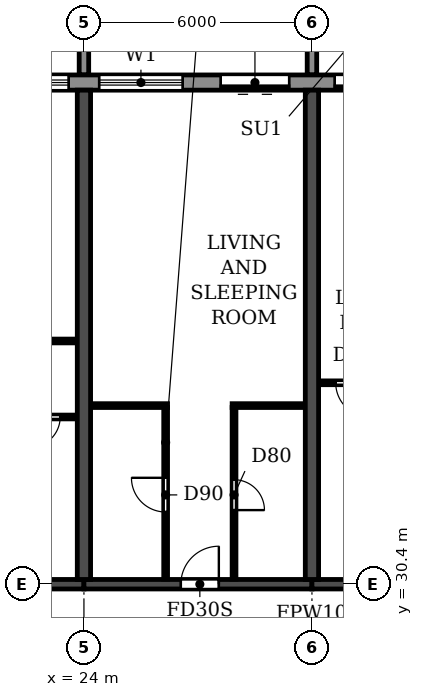
"""IFC4 building model, lengths in metres.
Left out: names, types, materials, properties, quantities, classifications, styles, units other than length and angle.
Written with IfcOpenShell. Run it as: python <this file> out.ifc"""

import sys

from ifc_helpers import new_model, si_unit, direction, frame, frame_2d, origin, place, context, subcontext, project, spatial, polyline, rectangle, outline, extrude, source, transform, mapped, element, fill, save


model = new_model("IFC4")
c1 = context("Model", 3, precision=1e-05, world=origin(), true_north=direction((0.0, 1.0)))
c2 = subcontext(c1, "Body", "Model", "MODEL_VIEW")
j1 = project(units=[si_unit("LENGTHUNIT", "METRE"), si_unit("PLANEANGLEUNIT", "RADIAN")], contexts=[c1])
p1 = place(None, origin())
s1 = spatial("IfcSite", under=j1, at=p1, CompositionType="ELEMENT")
p2 = place(p1, origin())
s2 = spatial("IfcBuilding", under=s1, at=p2, CompositionType="ELEMENT")
p3 = place(p2, frame((0.0, 0.0, 112.5)))
s3 = spatial("IfcBuildingStorey", under=s2, at=p3, CompositionType="ELEMENT", Elevation=112.5)
for number, where, z_axis, x_axis in (
    (1, (24.0, 30.525, 0.0), (0.0, 0.0, 1.0), (0.0, 1.0, 0.0)),
    (2, (30.0, 30.525, 0.0), (0.0, 0.0, 1.0), (0.0, 1.0, 0.0)),
):
    element("IfcWall", number, at=place(p3, frame(where, z_axis=z_axis, x_axis=x_axis)), inside=s3, PredefinedType="SHEAR", context=c2, shape_type="SweptSolid", body=[
        extrude(rectangle(XDim=12.875, YDim=0.35, at=frame_2d((6.438, 0.0))), origin(), (0.0, 0.0, 1.0), 2.95),
    ])
p4 = place(p3, frame((18.0, 30.4, 0.0), z_axis=(0.0, 0.0, 1.0), x_axis=(1.0, 0.0, 0.0)))
e3 = element("IfcWall", 3, at=p4, inside=s3, PredefinedType="SHEAR", context=c2, shape_type="SweptSolid", body=[
    extrude(rectangle(XDim=6.0, YDim=0.25, at=frame_2d((3.0, 0.0))), origin(), (0.0, 0.0, 1.0), 2.35),
])
p5 = place(p4, frame((2.55, 0.0, 0.0)))
e4 = element("IfcOpeningElement", 4, at=p5, cuts=e3, PredefinedType="OPENING", context=c2, shape_type="SweptSolid", body=[
    extrude(rectangle(XDim=1.0, YDim=2.1, at=frame_2d((0.5, 1.05))), frame((0.0, 0.135, 0.0), z_axis=(0.0, -1.0, 0.0), x_axis=(1.0, 0.0, 0.0)), (0.0, 0.0, 1.0), 0.27),
])
p6 = place(p3, frame((24.0, 30.4, 0.0), z_axis=(0.0, 0.0, 1.0), x_axis=(1.0, 0.0, 0.0)))
e5 = element("IfcWall", 5, at=p6, inside=s3, PredefinedType="SHEAR", context=c2, shape_type="SweptSolid", body=[
    extrude(rectangle(XDim=6.0, YDim=0.25, at=frame_2d((3.0, 0.0))), origin(), (0.0, 0.0, 1.0), 2.35),
])
p7 = place(p6, frame((2.55, 0.0, 0.0)))
e6 = element("IfcOpeningElement", 6, at=p7, cuts=e5, PredefinedType="OPENING", context=c2, shape_type="SweptSolid", body=[
    extrude(rectangle(XDim=1.0, YDim=2.1, at=frame_2d((0.5, 1.05))), frame((0.0, 0.135, 0.0), z_axis=(0.0, -1.0, 0.0), x_axis=(1.0, 0.0, 0.0)), (0.0, 0.0, 1.0), 0.27),
])
p8 = place(p3, frame((30.0, 30.4, 0.0), z_axis=(0.0, 0.0, 1.0), x_axis=(1.0, 0.0, 0.0)))
e7 = element("IfcWall", 7, at=p8, inside=s3, PredefinedType="SHEAR", context=c2, shape_type="SweptSolid", body=[
    extrude(rectangle(XDim=6.0, YDim=0.25, at=frame_2d((3.0, 0.0))), origin(), (0.0, 0.0, 1.0), 2.35),
])
p9 = place(p8, frame((2.55, 0.0, 0.0)))
e8 = element("IfcOpeningElement", 8, at=p9, cuts=e7, PredefinedType="OPENING", context=c2, shape_type="SweptSolid", body=[
    extrude(rectangle(XDim=1.0, YDim=2.1, at=frame_2d((0.5, 1.05))), frame((0.0, 0.135, 0.0), z_axis=(0.0, -1.0, 0.0), x_axis=(1.0, 0.0, 0.0)), (0.0, 0.0, 1.0), 0.27),
])
p10 = place(p3, frame((85.317, 43.6, 0.0), z_axis=(0.0, 0.0, 1.0), x_axis=(-1.0, 0.0, 0.0)))
e9 = element("IfcWall", 9, at=p10, inside=s3, PredefinedType="STANDARD", context=c2, shape_type="SweptSolid", body=[
    extrude(rectangle(XDim=68.634, YDim=0.4, at=frame_2d((34.317, 0.0))), origin(), (0.0, 0.0, 1.0), 2.95),
])
p11 = place(p10, frame((64.917, 0.0, 0.0)))
e10 = element("IfcOpeningElement", 10, at=p11, cuts=e9, PredefinedType="OPENING", context=c2, shape_type="SweptSolid", body=[
    extrude(rectangle(XDim=1.8, YDim=2.4, at=frame_2d((0.9, 1.2))), frame((0.0, 0.21, 0.0), z_axis=(0.0, -1.0, 0.0), x_axis=(1.0, 0.0, 0.0)), (0.0, 0.0, 1.0), 0.42),
])
p12 = place(p10, frame((61.717, 0.0, 0.9)))
e11 = element("IfcOpeningElement", 11, at=p12, cuts=e9, PredefinedType="OPENING", context=c2, shape_type="SweptSolid", body=[
    extrude(rectangle(XDim=2.2, YDim=1.5, at=frame_2d((1.1, 0.75))), frame((0.0, 0.21, 0.0), z_axis=(0.0, -1.0, 0.0), x_axis=(1.0, 0.0, 0.0)), (0.0, 0.0, 1.0), 0.42),
])
p13 = place(p10, frame((58.717, 0.0, 0.9)))
e12 = element("IfcOpeningElement", 12, at=p13, cuts=e9, PredefinedType="OPENING", context=c2, shape_type="SweptSolid", body=[
    extrude(rectangle(XDim=2.2, YDim=1.5, at=frame_2d((1.1, 0.75))), frame((0.0, 0.21, 0.0), z_axis=(0.0, -1.0, 0.0), x_axis=(1.0, 0.0, 0.0)), (0.0, 0.0, 1.0), 0.42),
])
p14 = place(p10, frame((55.917, 0.0, 0.0)))
e13 = element("IfcOpeningElement", 13, at=p14, cuts=e9, PredefinedType="OPENING", context=c2, shape_type="SweptSolid", body=[
    extrude(rectangle(XDim=1.8, YDim=2.4, at=frame_2d((0.9, 1.2))), frame((0.0, 0.21, 0.0), z_axis=(0.0, -1.0, 0.0), x_axis=(1.0, 0.0, 0.0)), (0.0, 0.0, 1.0), 0.42),
])
p15 = place(p10, frame((52.917, 0.0, 0.0)))
e14 = element("IfcOpeningElement", 14, at=p15, cuts=e9, PredefinedType="OPENING", context=c2, shape_type="SweptSolid", body=[
    extrude(rectangle(XDim=1.8, YDim=2.4, at=frame_2d((0.9, 1.2))), frame((0.0, 0.21, 0.0), z_axis=(0.0, -1.0, 0.0), x_axis=(1.0, 0.0, 0.0)), (0.0, 0.0, 1.0), 0.42),
])
p16 = place(p10, frame((49.717, 0.0, 0.9)))
e15 = element("IfcOpeningElement", 15, at=p16, cuts=e9, PredefinedType="OPENING", context=c2, shape_type="SweptSolid", body=[
    extrude(rectangle(XDim=2.2, YDim=1.5, at=frame_2d((1.1, 0.75))), frame((0.0, 0.21, 0.0), z_axis=(0.0, -1.0, 0.0), x_axis=(1.0, 0.0, 0.0)), (0.0, 0.0, 1.0), 0.42),
])
p17 = place(p10, frame((46.717, 0.0, 0.9)))
e16 = element("IfcOpeningElement", 16, at=p17, cuts=e9, PredefinedType="OPENING", context=c2, shape_type="SweptSolid", body=[
    extrude(rectangle(XDim=2.2, YDim=1.5, at=frame_2d((1.1, 0.75))), frame((0.0, 0.21, 0.0), z_axis=(0.0, -1.0, 0.0), x_axis=(1.0, 0.0, 0.0)), (0.0, 0.0, 1.0), 0.42),
])
p18 = place(p10, frame((43.917, 0.0, 0.0)))
e17 = element("IfcOpeningElement", 17, at=p18, cuts=e9, PredefinedType="OPENING", context=c2, shape_type="SweptSolid", body=[
    extrude(rectangle(XDim=1.8, YDim=2.4, at=frame_2d((0.9, 1.2))), frame((0.0, 0.21, 0.0), z_axis=(0.0, -1.0, 0.0), x_axis=(1.0, 0.0, 0.0)), (0.0, 0.0, 1.0), 0.42),
])
p19 = place(p10, frame((40.717, 0.0, 0.9)))
e18 = element("IfcOpeningElement", 18, at=p19, cuts=e9, PredefinedType="OPENING", context=c2, shape_type="SweptSolid", body=[
    extrude(rectangle(XDim=2.2, YDim=1.5, at=frame_2d((1.1, 0.75))), frame((0.0, 0.21, 0.0), z_axis=(0.0, -1.0, 0.0), x_axis=(1.0, 0.0, 0.0)), (0.0, 0.0, 1.0), 0.42),
])
p20 = place(p10, frame((37.717, 0.0, 0.9)))
e19 = element("IfcOpeningElement", 19, at=p20, cuts=e9, PredefinedType="OPENING", context=c2, shape_type="SweptSolid", body=[
    extrude(rectangle(XDim=2.2, YDim=1.5, at=frame_2d((1.1, 0.75))), frame((0.0, 0.21, 0.0), z_axis=(0.0, -1.0, 0.0), x_axis=(1.0, 0.0, 0.0)), (0.0, 0.0, 1.0), 0.42),
])
p21 = place(p10, frame((34.917, 0.0, 0.0)))
e20 = element("IfcOpeningElement", 20, at=p21, cuts=e9, PredefinedType="OPENING", context=c2, shape_type="SweptSolid", body=[
    extrude(rectangle(XDim=1.8, YDim=2.4, at=frame_2d((0.9, 1.2))), frame((0.0, 0.21, 0.0), z_axis=(0.0, -1.0, 0.0), x_axis=(1.0, 0.0, 0.0)), (0.0, 0.0, 1.0), 0.42),
])
p22 = place(p10, frame((31.717, 0.0, 0.9)))
e21 = element("IfcOpeningElement", 21, at=p22, cuts=e9, PredefinedType="OPENING", context=c2, shape_type="SweptSolid", body=[
    extrude(rectangle(XDim=2.2, YDim=1.5, at=frame_2d((1.1, 0.75))), frame((0.0, 0.21, 0.0), z_axis=(0.0, -1.0, 0.0), x_axis=(1.0, 0.0, 0.0)), (0.0, 0.0, 1.0), 0.42),
])
p23 = place(p10, frame((28.917, 0.0, 0.0)))
e22 = element("IfcOpeningElement", 22, at=p23, cuts=e9, PredefinedType="OPENING", context=c2, shape_type="SweptSolid", body=[
    extrude(rectangle(XDim=1.8, YDim=2.4, at=frame_2d((0.9, 1.2))), frame((0.0, 0.21, 0.0), z_axis=(0.0, -1.0, 0.0), x_axis=(1.0, 0.0, 0.0)), (0.0, 0.0, 1.0), 0.42),
])
p24 = place(p10, frame((25.717, 0.0, 0.9)))
e23 = element("IfcOpeningElement", 23, at=p24, cuts=e9, PredefinedType="OPENING", context=c2, shape_type="SweptSolid", body=[
    extrude(rectangle(XDim=2.2, YDim=1.5, at=frame_2d((1.1, 0.75))), frame((0.0, 0.21, 0.0), z_axis=(0.0, -1.0, 0.0), x_axis=(1.0, 0.0, 0.0)), (0.0, 0.0, 1.0), 0.42),
])
p25 = place(p10, frame((22.717, 0.0, 0.9)))
e24 = element("IfcOpeningElement", 24, at=p25, cuts=e9, PredefinedType="OPENING", context=c2, shape_type="SweptSolid", body=[
    extrude(rectangle(XDim=2.2, YDim=1.5, at=frame_2d((1.1, 0.75))), frame((0.0, 0.21, 0.0), z_axis=(0.0, -1.0, 0.0), x_axis=(1.0, 0.0, 0.0)), (0.0, 0.0, 1.0), 0.42),
])
p26 = place(p10, frame((19.917, 0.0, 0.0)))
e25 = element("IfcOpeningElement", 25, at=p26, cuts=e9, PredefinedType="OPENING", context=c2, shape_type="SweptSolid", body=[
    extrude(rectangle(XDim=1.8, YDim=2.4, at=frame_2d((0.9, 1.2))), frame((0.0, 0.21, 0.0), z_axis=(0.0, -1.0, 0.0), x_axis=(1.0, 0.0, 0.0)), (0.0, 0.0, 1.0), 0.42),
])
p27 = place(p10, frame((16.717, 0.0, 0.9)))
e26 = element("IfcOpeningElement", 26, at=p27, cuts=e9, PredefinedType="OPENING", context=c2, shape_type="SweptSolid", body=[
    extrude(rectangle(XDim=2.2, YDim=1.5, at=frame_2d((1.1, 0.75))), frame((0.0, 0.21, 0.0), z_axis=(0.0, -1.0, 0.0), x_axis=(1.0, 0.0, 0.0)), (0.0, 0.0, 1.0), 0.42),
])
p28 = place(p10, frame((13.917, 0.0, 0.0)))
e27 = element("IfcOpeningElement", 27, at=p28, cuts=e9, PredefinedType="OPENING", context=c2, shape_type="SweptSolid", body=[
    extrude(rectangle(XDim=1.8, YDim=2.4, at=frame_2d((0.9, 1.2))), frame((0.0, 0.21, 0.0), z_axis=(0.0, -1.0, 0.0), x_axis=(1.0, 0.0, 0.0)), (0.0, 0.0, 1.0), 0.42),
])
p29 = place(p10, frame((10.717, 0.0, 0.9)))
e28 = element("IfcOpeningElement", 28, at=p29, cuts=e9, PredefinedType="OPENING", context=c2, shape_type="SweptSolid", body=[
    extrude(rectangle(XDim=2.2, YDim=1.5, at=frame_2d((1.1, 0.75))), frame((0.0, 0.21, 0.0), z_axis=(0.0, -1.0, 0.0), x_axis=(1.0, 0.0, 0.0)), (0.0, 0.0, 1.0), 0.42),
])
p30 = place(p10, frame((7.717, 0.0, 0.9)))
e29 = element("IfcOpeningElement", 29, at=p30, cuts=e9, PredefinedType="OPENING", context=c2, shape_type="SweptSolid", body=[
    extrude(rectangle(XDim=2.2, YDim=1.5, at=frame_2d((1.1, 0.75))), frame((0.0, 0.21, 0.0), z_axis=(0.0, -1.0, 0.0), x_axis=(1.0, 0.0, 0.0)), (0.0, 0.0, 1.0), 0.42),
])
p31 = place(p10, frame((4.917, 0.0, 0.0)))
e30 = element("IfcOpeningElement", 30, at=p31, cuts=e9, PredefinedType="OPENING", context=c2, shape_type="SweptSolid", body=[
    extrude(rectangle(XDim=1.8, YDim=2.4, at=frame_2d((0.9, 1.2))), frame((0.0, 0.21, 0.0), z_axis=(0.0, -1.0, 0.0), x_axis=(1.0, 0.0, 0.0)), (0.0, 0.0, 1.0), 0.42),
])
p32 = place(p10, frame((1.717, 0.0, 0.9)))
e31 = element("IfcOpeningElement", 31, at=p32, cuts=e9, PredefinedType="OPENING", context=c2, shape_type="SweptSolid", body=[
    extrude(rectangle(XDim=2.2, YDim=1.5, at=frame_2d((1.1, 0.75))), frame((0.0, 0.21, 0.0), z_axis=(0.0, -1.0, 0.0), x_axis=(1.0, 0.0, 0.0)), (0.0, 0.0, 1.0), 0.42),
])
m1 = source(origin(), c2, "Body", "SweptSolid", [
    extrude(outline(polyline([(0.0, 0.0), (0.25, 0.0), (0.25, 3.1), (0.0, 3.1), (0.0, 0.0)])), origin(), (0.0, 0.0, 1.0), 3.1),
])
for number, where in (
    (32, (23.875, 43.8, 0.0)),
    (33, (29.875, 43.8, 0.0)),
):
    element("IfcWall", number, at=place(p3, frame(where)), inside=s3, PredefinedType="STANDARD", context=c2, shape_type="MappedRepresentation", body=[
        mapped(m1, transform((0.0, 0.0, 0.0))),
    ])
p33 = place(p3, frame((21.9, 34.8, 0.0), z_axis=(0.0, 0.0, 1.0), x_axis=(1.0, 0.0, 0.0)))
e34 = element("IfcWall", 34, at=p33, inside=s3, PredefinedType="PARTITIONING", context=c2, shape_type="SweptSolid", body=[
    extrude(rectangle(XDim=1.915, YDim=0.1, at=frame_2d((0.958, 0.0))), origin(), (0.0, 0.0, 1.0), 2.95),
])
p34 = place(p33, frame((0.675, 0.0, 0.0)))
e35 = element("IfcOpeningElement", 35, at=p34, cuts=e34, PredefinedType="OPENING", context=c2, shape_type="SweptSolid", body=[
    extrude(rectangle(XDim=0.8, YDim=2.1, at=frame_2d((0.4, 1.05))), frame((0.0, 0.06, 0.0), z_axis=(0.0, -1.0, 0.0), x_axis=(1.0, 0.0, 0.0)), (0.0, 0.0, 1.0), 0.12),
])
p35 = place(p3, frame((24.185, 35.1, 0.0), z_axis=(0.0, 0.0, 1.0), x_axis=(1.0, 0.0, 0.0)))
e36 = element("IfcWall", 36, at=p35, inside=s3, PredefinedType="PARTITIONING", context=c2, shape_type="SweptSolid", body=[
    extrude(rectangle(XDim=2.015, YDim=0.1, at=frame_2d((1.007, 0.0))), origin(), (0.0, 0.0, 1.0), 2.95),
])
p36 = place(p3, frame((27.9, 35.1, 0.0), z_axis=(0.0, 0.0, 1.0), x_axis=(1.0, 0.0, 0.0)))
e37 = element("IfcWall", 37, at=p36, inside=s3, PredefinedType="PARTITIONING", context=c2, shape_type="SweptSolid", body=[
    extrude(rectangle(XDim=1.915, YDim=0.1, at=frame_2d((0.958, 0.0))), origin(), (0.0, 0.0, 1.0), 2.95),
])
p37 = place(p3, frame((30.185, 35.7, 0.0), z_axis=(0.0, 0.0, 1.0), x_axis=(1.0, 0.0, 0.0)))
e38 = element("IfcWall", 38, at=p37, inside=s3, PredefinedType="PARTITIONING", context=c2, shape_type="SweptSolid", body=[
    extrude(rectangle(XDim=2.015, YDim=0.1, at=frame_2d((1.007, 0.0))), origin(), (0.0, 0.0, 1.0), 2.95),
])
p38 = place(p37, frame((0.44, 0.0, 0.0)))
e39 = element("IfcOpeningElement", 39, at=p38, cuts=e38, PredefinedType="OPENING", context=c2, shape_type="SweptSolid", body=[
    extrude(rectangle(XDim=0.9, YDim=2.1, at=frame_2d((0.45, 1.05))), frame((0.0, 0.06, 0.0), z_axis=(0.0, -1.0, 0.0), x_axis=(1.0, 0.0, 0.0)), (0.0, 0.0, 1.0), 0.12),
])
p39 = place(p3, frame((20.95, 36.8, 0.0), z_axis=(0.0, 0.0, 1.0), x_axis=(1.0, 0.0, 0.0)))
e40 = element("IfcWall", 40, at=p39, inside=s3, PredefinedType="PARTITIONING", context=c2, shape_type="SweptSolid", body=[
    extrude(rectangle(XDim=2.865, YDim=0.1, at=frame_2d((1.433, 0.0))), origin(), (0.0, 0.0, 1.0), 2.95),
])
p40 = place(p39, frame((0.55, 0.0, 0.0)))
e41 = element("IfcOpeningElement", 41, at=p40, cuts=e40, PredefinedType="OPENING", context=c2, shape_type="SweptSolid", body=[
    extrude(rectangle(XDim=0.9, YDim=2.1, at=frame_2d((0.45, 1.05))), frame((0.0, 0.06, 0.0), z_axis=(0.0, -1.0, 0.0), x_axis=(1.0, 0.0, 0.0)), (0.0, 0.0, 1.0), 0.12),
])
p41 = place(p3, frame((26.15, 30.535, 0.0), z_axis=(0.0, 0.0, 1.0), x_axis=(0.0, 1.0, 0.0)))
e42 = element("IfcWall", 42, at=p41, inside=s3, PredefinedType="PARTITIONING", context=c2, shape_type="SweptSolid", body=[
    extrude(rectangle(XDim=4.515, YDim=0.1, at=frame_2d((2.258, 0.0))), origin(), (0.0, 0.0, 1.0), 2.95),
])
p42 = place(p41, frame((1.765, 0.0, 0.0)))
e43 = element("IfcOpeningElement", 43, at=p42, cuts=e42, PredefinedType="OPENING", context=c2, shape_type="SweptSolid", body=[
    extrude(rectangle(XDim=0.9, YDim=2.1, at=frame_2d((0.45, 1.05))), frame((0.0, 0.06, 0.0), z_axis=(0.0, -1.0, 0.0), x_axis=(1.0, 0.0, 0.0)), (0.0, 0.0, 1.0), 0.12),
])
p43 = place(p3, frame((27.95, 30.535, 0.0), z_axis=(0.0, 0.0, 1.0), x_axis=(0.0, 1.0, 0.0)))
e44 = element("IfcWall", 44, at=p43, inside=s3, PredefinedType="PARTITIONING", context=c2, shape_type="SweptSolid", body=[
    extrude(rectangle(XDim=4.515, YDim=0.1, at=frame_2d((2.258, 0.0))), origin(), (0.0, 0.0, 1.0), 2.95),
])
p44 = place(p43, frame((1.815, 0.0, 0.0)))
e45 = element("IfcOpeningElement", 45, at=p44, cuts=e44, PredefinedType="OPENING", context=c2, shape_type="SweptSolid", body=[
    extrude(rectangle(XDim=0.8, YDim=2.1, at=frame_2d((0.4, 1.05))), frame((0.0, 0.06, 0.0), z_axis=(0.0, -1.0, 0.0), x_axis=(1.0, 0.0, 0.0)), (0.0, 0.0, 1.0), 0.12),
])
p45 = place(p12, origin())
e46 = element("IfcWindow", 46, at=p45, inside=s3, PartitioningType="DOUBLE_PANEL_HORIZONTAL", PredefinedType="WINDOW", context=c2, shape_type="SweptSolid", body=[
    extrude(rectangle(XDim=2.2, YDim=1.5, at=frame_2d((1.1, 0.75))), frame((0.0, 0.03, 0.0), z_axis=(0.0, -1.0, 0.0), x_axis=(1.0, 0.0, 0.0)), (0.0, 0.0, 1.0), 0.06),
])
fill(e11, e46)
p46 = place(p13, origin())
e47 = element("IfcWindow", 47, at=p46, inside=s3, PartitioningType="DOUBLE_PANEL_HORIZONTAL", PredefinedType="WINDOW", context=c2, shape_type="SweptSolid", body=[
    extrude(rectangle(XDim=2.2, YDim=1.5, at=frame_2d((1.1, 0.75))), frame((0.0, 0.03, 0.0), z_axis=(0.0, -1.0, 0.0), x_axis=(1.0, 0.0, 0.0)), (0.0, 0.0, 1.0), 0.06),
])
fill(e12, e47)
p47 = place(p14, origin())
e48 = element("IfcDoor", 48, at=p47, inside=s3, OperationType="DOUBLE_DOOR_SLIDING", PredefinedType="DOOR", context=c2, shape_type="SweptSolid", body=[
    extrude(rectangle(XDim=1.8, YDim=2.4, at=frame_2d((0.9, 1.2))), frame((0.0, 0.025, 0.0), z_axis=(0.0, -1.0, 0.0), x_axis=(1.0, 0.0, 0.0)), (0.0, 0.0, 1.0), 0.05),
])
fill(e13, e48)
p48 = place(p15, origin())
e49 = element("IfcDoor", 49, at=p48, inside=s3, OperationType="DOUBLE_DOOR_SLIDING", PredefinedType="DOOR", context=c2, shape_type="SweptSolid", body=[
    extrude(rectangle(XDim=1.8, YDim=2.4, at=frame_2d((0.9, 1.2))), frame((0.0, 0.025, 0.0), z_axis=(0.0, -1.0, 0.0), x_axis=(1.0, 0.0, 0.0)), (0.0, 0.0, 1.0), 0.05),
])
fill(e14, e49)
p49 = place(p34, frame((0.8, 0.0, 0.0), z_axis=(0.0, 0.0, 1.0), x_axis=(-1.0, 0.0, 0.0)))
e50 = element("IfcDoor", 50, at=p49, inside=s3, OperationType="SINGLE_SWING_RIGHT", PredefinedType="DOOR", context=c2, shape_type="SweptSolid", body=[
    extrude(rectangle(XDim=0.8, YDim=2.1, at=frame_2d((0.4, 1.05))), frame((0.0, 0.025, 0.0), z_axis=(0.0, -1.0, 0.0), x_axis=(1.0, 0.0, 0.0)), (0.0, 0.0, 1.0), 0.05),
])
fill(e35, e50)
p50 = place(p42, origin())
e51 = element("IfcDoor", 51, at=p50, inside=s3, OperationType="SINGLE_SWING_RIGHT", PredefinedType="DOOR", context=c2, shape_type="SweptSolid", body=[
    extrude(rectangle(XDim=0.9, YDim=2.1, at=frame_2d((0.45, 1.05))), frame((0.0, 0.025, 0.0), z_axis=(0.0, -1.0, 0.0), x_axis=(1.0, 0.0, 0.0)), (0.0, 0.0, 1.0), 0.05),
])
fill(e43, e51)
p51 = place(p7, origin())
e52 = element("IfcDoor", 52, at=p51, inside=s3, OperationType="SINGLE_SWING_RIGHT", PredefinedType="DOOR", context=c2, shape_type="SweptSolid", body=[
    extrude(rectangle(XDim=1.0, YDim=2.1, at=frame_2d((0.5, 1.05))), frame((0.0, 0.025, 0.0), z_axis=(0.0, -1.0, 0.0), x_axis=(1.0, 0.0, 0.0)), (0.0, 0.0, 1.0), 0.05),
])
fill(e6, e52)
p52 = place(p44, frame((0.8, 0.0, 0.0), z_axis=(0.0, 0.0, 1.0), x_axis=(-1.0, 0.0, 0.0)))
e53 = element("IfcDoor", 53, at=p52, inside=s3, OperationType="SINGLE_SWING_RIGHT", PredefinedType="DOOR", context=c2, shape_type="SweptSolid", body=[
    extrude(rectangle(XDim=0.8, YDim=2.1, at=frame_2d((0.4, 1.05))), frame((0.0, 0.025, 0.0), z_axis=(0.0, -1.0, 0.0), x_axis=(1.0, 0.0, 0.0)), (0.0, 0.0, 1.0), 0.05),
])
fill(e45, e53)
p53 = place(p38, frame((0.9, 0.0, 0.0), z_axis=(0.0, 0.0, 1.0), x_axis=(-1.0, 0.0, 0.0)))
e54 = element("IfcDoor", 54, at=p53, inside=s3, OperationType="SINGLE_SWING_LEFT", PredefinedType="DOOR", context=c2, shape_type="SweptSolid", body=[
    extrude(rectangle(XDim=0.9, YDim=2.1, at=frame_2d((0.45, 1.05))), frame((0.0, 0.025, 0.0), z_axis=(0.0, -1.0, 0.0), x_axis=(1.0, 0.0, 0.0)), (0.0, 0.0, 1.0), 0.05),
])
fill(e39, e54)
save(model, sys.argv[1])
